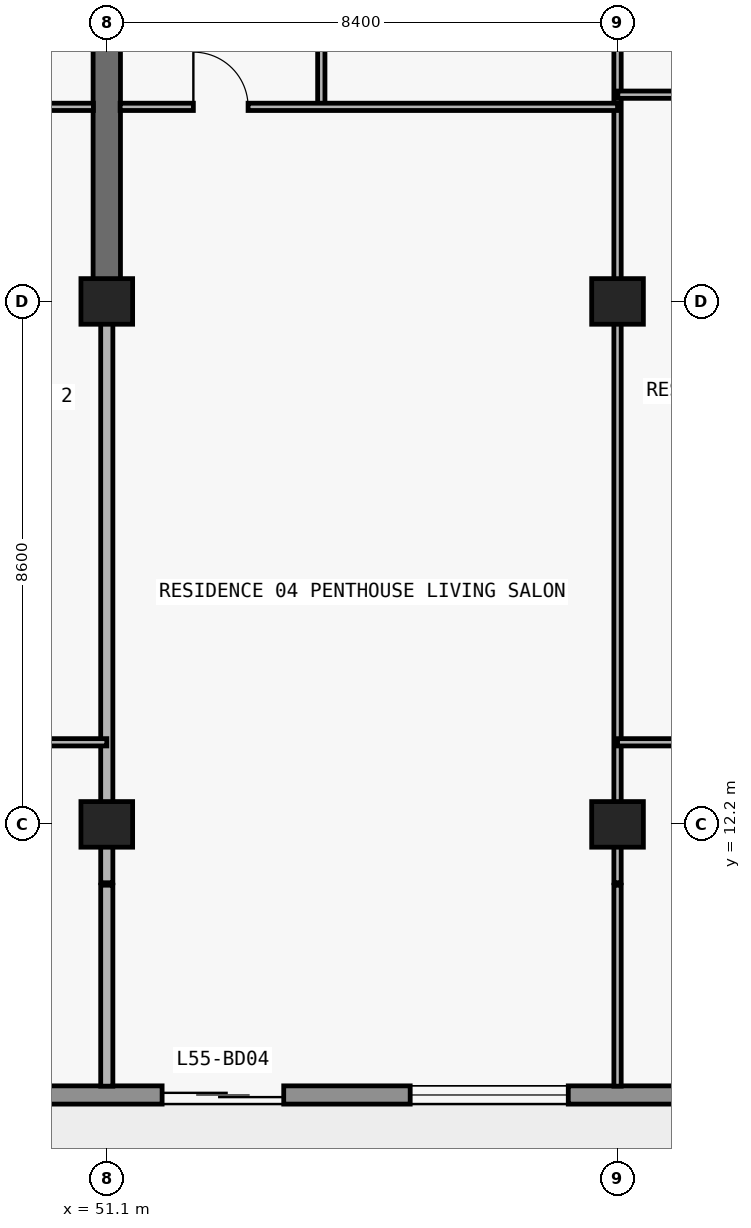
"""IFC4 building model, lengths in metres.
Left out: names, types, materials, properties, quantities, classifications, styles, units other than length and angle.
Written with IfcOpenShell. Run it as: python <this file> out.ifc"""

import sys

from ifc_helpers import new_model, si_unit, direction, frame, frame_2d, origin, origin_2d, place, context, subcontext, project, spatial, rectangle, extrude, element, fill, save


model = new_model("IFC4")
c1 = context("Model", 3, precision=1e-05, world=origin(), true_north=direction((0.0, 1.0)))
c2 = subcontext(c1, "Body", "Model", "MODEL_VIEW")
j1 = project(units=[si_unit("LENGTHUNIT", "METRE"), si_unit("PLANEANGLEUNIT", "RADIAN")], contexts=[c1])
p1 = place(None, origin())
s1 = spatial("IfcSite", under=j1, at=p1, CompositionType="ELEMENT")
p2 = place(p1, origin())
s2 = spatial("IfcBuilding", under=s1, at=p2, CompositionType="ELEMENT")
p3 = place(p2, frame((0.0, 0.0, 198.3)))
s3 = spatial("IfcBuildingStorey", under=s2, at=p3, CompositionType="ELEMENT", Elevation=198.3)
for number, where, z_axis, x_axis in (
    (1, (51.1, 12.2, 0.0), (0.0, 0.0, 1.0), (1.0, 0.0, 0.0)),
    (2, (59.5, 12.2, 0.0), (0.0, 0.0, 1.0), (1.0, 0.0, 0.0)),
    (3, (51.1, 20.8, 0.0), (0.0, 0.0, 1.0), (1.0, 0.0, 0.0)),
    (4, (59.5, 20.8, 0.0), (0.0, 0.0, 1.0), (1.0, 0.0, 0.0)),
):
    element("IfcColumn", number, at=place(p3, frame(where, z_axis=z_axis, x_axis=x_axis)), inside=s3, PredefinedType="COLUMN", context=c2, shape_type="SweptSolid", body=[
        extrude(rectangle(XDim=0.85, YDim=0.75, at=origin_2d()), origin(), (0.0, 0.0, 1.0), 3.05),
    ])
p4 = place(p3, frame((51.1, 20.8, 0.0), z_axis=(0.0, 0.0, 1.0), x_axis=(0.0, 1.0, 0.0)))
e5 = element("IfcWall", 5, at=p4, inside=s3, PredefinedType="SHEAR", context=c2, shape_type="SweptSolid", body=[
    extrude(rectangle(XDim=8.6, YDim=0.45, at=frame_2d((4.3, 0.0))), origin(), (0.0, 0.0, 1.0), 3.05),
])
p5 = place(p3, frame((67.7, 7.75, 0.0), z_axis=(0.0, 0.0, 1.0), x_axis=(-1.0, 0.0, 0.0)))
e6 = element("IfcWall", 6, at=p5, inside=s3, PredefinedType="STANDARD", context=c2, shape_type="SweptSolid", body=[
    extrude(rectangle(XDim=57.6, YDim=0.3, at=frame_2d((28.8, 0.0))), origin(), (0.0, 0.0, 1.0), 3.05),
])
p6 = place(p5, frame((54.673, 0.0, 0.0)))
e7 = element("IfcOpeningElement", 7, at=p6, cuts=e6, PredefinedType="OPENING", context=c2, shape_type="SweptSolid", body=[
    extrude(rectangle(XDim=2.0, YDim=2.3, at=frame_2d((1.0, 1.15))), frame((0.0, 0.16, 0.0), z_axis=(0.0, -1.0, 0.0), x_axis=(1.0, 0.0, 0.0)), (0.0, 0.0, 1.0), 0.32),
])
p7 = place(p5, frame((50.473, 0.0, 0.85)))
e8 = element("IfcOpeningElement", 8, at=p7, cuts=e6, PredefinedType="OPENING", context=c2, shape_type="SweptSolid", body=[
    extrude(rectangle(XDim=2.2, YDim=1.55, at=frame_2d((1.1, 0.775))), frame((0.0, 0.16, 0.0), z_axis=(0.0, -1.0, 0.0), x_axis=(1.0, 0.0, 0.0)), (0.0, 0.0, 1.0), 0.32),
])
p8 = place(p5, frame((46.09, 0.0, 0.0)))
e9 = element("IfcOpeningElement", 9, at=p8, cuts=e6, PredefinedType="OPENING", context=c2, shape_type="SweptSolid", body=[
    extrude(rectangle(XDim=2.0, YDim=2.3, at=frame_2d((1.0, 1.15))), frame((0.0, 0.16, 0.0), z_axis=(0.0, -1.0, 0.0), x_axis=(1.0, 0.0, 0.0)), (0.0, 0.0, 1.0), 0.32),
])
p9 = place(p5, frame((41.99, 0.0, 0.85)))
e10 = element("IfcOpeningElement", 10, at=p9, cuts=e6, PredefinedType="OPENING", context=c2, shape_type="SweptSolid", body=[
    extrude(rectangle(XDim=1.8, YDim=1.55, at=frame_2d((0.9, 0.775))), frame((0.0, 0.16, 0.0), z_axis=(0.0, -1.0, 0.0), x_axis=(1.0, 0.0, 0.0)), (0.0, 0.0, 1.0), 0.32),
])
p10 = place(p5, frame((38.09, 0.0, 0.0)))
e11 = element("IfcOpeningElement", 11, at=p10, cuts=e6, PredefinedType="OPENING", context=c2, shape_type="SweptSolid", body=[
    extrude(rectangle(XDim=2.0, YDim=2.3, at=frame_2d((1.0, 1.15))), frame((0.0, 0.16, 0.0), z_axis=(0.0, -1.0, 0.0), x_axis=(1.0, 0.0, 0.0)), (0.0, 0.0, 1.0), 0.32),
])
p11 = place(p5, frame((33.41, 0.0, 0.65)))
e12 = element("IfcOpeningElement", 12, at=p11, cuts=e6, PredefinedType="OPENING", context=c2, shape_type="SweptSolid", body=[
    extrude(rectangle(XDim=2.6, YDim=1.85, at=frame_2d((1.3, 0.925))), frame((0.0, 0.16, 0.0), z_axis=(0.0, -1.0, 0.0), x_axis=(1.0, 0.0, 0.0)), (0.0, 0.0, 1.0), 0.32),
])
p12 = place(p5, frame((27.7, 0.0, 0.85)))
e13 = element("IfcOpeningElement", 13, at=p12, cuts=e6, PredefinedType="OPENING", context=c2, shape_type="SweptSolid", body=[
    extrude(rectangle(XDim=2.2, YDim=1.55, at=frame_2d((1.1, 0.775))), frame((0.0, 0.16, 0.0), z_axis=(0.0, -1.0, 0.0), x_axis=(1.0, 0.0, 0.0)), (0.0, 0.0, 1.0), 0.32),
])
p13 = place(p5, frame((19.7, 0.0, 0.85)))
e14 = element("IfcOpeningElement", 14, at=p13, cuts=e6, PredefinedType="OPENING", context=c2, shape_type="SweptSolid", body=[
    extrude(rectangle(XDim=2.2, YDim=1.55, at=frame_2d((1.1, 0.775))), frame((0.0, 0.16, 0.0), z_axis=(0.0, -1.0, 0.0), x_axis=(1.0, 0.0, 0.0)), (0.0, 0.0, 1.0), 0.32),
])
p14 = place(p5, frame((13.69, 0.0, 0.0)))
e15 = element("IfcOpeningElement", 15, at=p14, cuts=e6, PredefinedType="OPENING", context=c2, shape_type="SweptSolid", body=[
    extrude(rectangle(XDim=2.0, YDim=2.3, at=frame_2d((1.0, 1.15))), frame((0.0, 0.16, 0.0), z_axis=(0.0, -1.0, 0.0), x_axis=(1.0, 0.0, 0.0)), (0.0, 0.0, 1.0), 0.32),
])
p15 = place(p5, frame((9.01, 0.0, 0.65)))
e16 = element("IfcOpeningElement", 16, at=p15, cuts=e6, PredefinedType="OPENING", context=c2, shape_type="SweptSolid", body=[
    extrude(rectangle(XDim=2.6, YDim=1.85, at=frame_2d((1.3, 0.925))), frame((0.0, 0.16, 0.0), z_axis=(0.0, -1.0, 0.0), x_axis=(1.0, 0.0, 0.0)), (0.0, 0.0, 1.0), 0.32),
])
p16 = place(p5, frame((3.0, 0.0, 0.85)))
e17 = element("IfcOpeningElement", 17, at=p16, cuts=e6, PredefinedType="OPENING", context=c2, shape_type="SweptSolid", body=[
    extrude(rectangle(XDim=2.2, YDim=1.55, at=frame_2d((1.1, 0.775))), frame((0.0, 0.16, 0.0), z_axis=(0.0, -1.0, 0.0), x_axis=(1.0, 0.0, 0.0)), (0.0, 0.0, 1.0), 0.32),
])
p17 = place(p3, frame((51.1, 7.895, 0.0), z_axis=(0.0, 0.0, 1.0), x_axis=(0.0, 1.0, 0.0)))
e18 = element("IfcWall", 18, at=p17, inside=s3, PredefinedType="PARTITIONING", context=c2, shape_type="SweptSolid", body=[
    extrude(rectangle(XDim=3.305, YDim=0.2, at=frame_2d((1.652, 0.0))), origin(), (0.0, 0.0, 1.0), 3.05),
])
p18 = place(p3, frame((51.1, 11.24, 0.0), z_axis=(0.0, 0.0, 1.0), x_axis=(0.0, 1.0, 0.0)))
e19 = element("IfcWall", 19, at=p18, inside=s3, PredefinedType="PARTITIONING", context=c2, shape_type="SweptSolid", body=[
    extrude(rectangle(XDim=9.555, YDim=0.2, at=frame_2d((4.777, 0.0))), origin(), (0.0, 0.0, 1.0), 2.263),
])
p19 = place(p3, frame((54.628, 24.0, 0.0), z_axis=(0.0, 0.0, 1.0), x_axis=(0.0, 1.0, 0.0)))
e20 = element("IfcWall", 20, at=p19, inside=s3, PredefinedType="PARTITIONING", context=c2, shape_type="SweptSolid", body=[
    extrude(rectangle(XDim=4.8, YDim=0.12, at=frame_2d((2.4, 0.0))), origin(), (0.0, 0.0, 1.0), 3.05),
])
p20 = place(p19, frame((1.95, 0.0, 0.0)))
e21 = element("IfcOpeningElement", 21, at=p20, cuts=e20, PredefinedType="OPENING", context=c2, shape_type="SweptSolid", body=[
    extrude(rectangle(XDim=0.9, YDim=2.15, at=frame_2d((0.45, 1.075))), frame((0.0, 0.07, 0.0), z_axis=(0.0, -1.0, 0.0), x_axis=(1.0, 0.0, 0.0)), (0.0, 0.0, 1.0), 0.14),
])
p21 = place(p3, frame((59.5, 7.895, 0.0), z_axis=(0.0, 0.0, 1.0), x_axis=(0.0, 1.0, 0.0)))
e22 = element("IfcWall", 22, at=p21, inside=s3, PredefinedType="PARTITIONING", context=c2, shape_type="SweptSolid", body=[
    extrude(rectangle(XDim=3.305, YDim=0.12, at=frame_2d((1.652, 0.0))), origin(), (0.0, 0.0, 1.0), 3.05),
])
p22 = place(p3, frame((59.5, 11.24, 0.0), z_axis=(0.0, 0.0, 1.0), x_axis=(0.0, 1.0, 0.0)))
e23 = element("IfcWall", 23, at=p22, inside=s3, PredefinedType="PARTITIONING", context=c2, shape_type="SweptSolid", body=[
    extrude(rectangle(XDim=23.46, YDim=0.12, at=frame_2d((11.73, 0.0))), origin(), (0.0, 0.0, 1.0), 2.263),
])
p23 = place(p22, frame((14.71, 0.0, 0.0)))
e24 = element("IfcOpeningElement", 24, at=p23, cuts=e23, PredefinedType="OPENING", context=c2, shape_type="SweptSolid", body=[
    extrude(rectangle(XDim=0.9, YDim=2.15, at=frame_2d((0.45, 1.075))), frame((0.0, 0.07, 0.0), z_axis=(0.0, -1.0, 0.0), x_axis=(1.0, 0.0, 0.0)), (0.0, 0.0, 1.0), 0.14),
])
p24 = place(p3, frame((35.1, 13.55, 0.0), z_axis=(0.0, 0.0, 1.0), x_axis=(1.0, 0.0, 0.0)))
e25 = element("IfcWall", 25, at=p24, inside=s3, PredefinedType="PARTITIONING", context=c2, shape_type="SweptSolid", body=[
    extrude(rectangle(XDim=16.0, YDim=0.12, at=frame_2d((8.0, 0.0))), origin(), (0.0, 0.0, 1.0), 3.05),
])
p25 = place(p24, frame((3.35, 0.0, 0.0)))
e26 = element("IfcOpeningElement", 26, at=p25, cuts=e25, PredefinedType="OPENING", context=c2, shape_type="SweptSolid", body=[
    extrude(rectangle(XDim=0.9, YDim=2.15, at=frame_2d((0.45, 1.075))), frame((0.0, 0.07, 0.0), z_axis=(0.0, -1.0, 0.0), x_axis=(1.0, 0.0, 0.0)), (0.0, 0.0, 1.0), 0.14),
])
p26 = place(p24, frame((11.35, 0.0, 0.0)))
e27 = element("IfcOpeningElement", 27, at=p26, cuts=e25, PredefinedType="OPENING", context=c2, shape_type="SweptSolid", body=[
    extrude(rectangle(XDim=0.9, YDim=2.15, at=frame_2d((0.45, 1.075))), frame((0.0, 0.07, 0.0), z_axis=(0.0, -1.0, 0.0), x_axis=(1.0, 0.0, 0.0)), (0.0, 0.0, 1.0), 0.14),
])
p27 = place(p3, frame((59.5, 13.55, 0.0), z_axis=(0.0, 0.0, 1.0), x_axis=(1.0, 0.0, 0.0)))
e28 = element("IfcWall", 28, at=p27, inside=s3, PredefinedType="PARTITIONING", context=c2, shape_type="SweptSolid", body=[
    extrude(rectangle(XDim=8.2, YDim=0.12, at=frame_2d((4.1, 0.0))), origin(), (0.0, 0.0, 1.0), 3.05),
])
p28 = place(p27, frame((3.65, 0.0, 0.0)))
e29 = element("IfcOpeningElement", 29, at=p28, cuts=e28, PredefinedType="OPENING", context=c2, shape_type="SweptSolid", body=[
    extrude(rectangle(XDim=0.9, YDim=2.15, at=frame_2d((0.45, 1.075))), frame((0.0, 0.07, 0.0), z_axis=(0.0, -1.0, 0.0), x_axis=(1.0, 0.0, 0.0)), (0.0, 0.0, 1.0), 0.14),
])
p29 = place(p3, frame((42.7, 24.0, 0.0), z_axis=(0.0, 0.0, 1.0), x_axis=(1.0, 0.0, 0.0)))
e30 = element("IfcWall", 30, at=p29, inside=s3, PredefinedType="PARTITIONING", context=c2, shape_type="SweptSolid", body=[
    extrude(rectangle(XDim=8.18, YDim=0.12, at=frame_2d((4.09, 0.0))), origin(), (0.0, 0.0, 1.0), 3.05),
])
p30 = place(p29, frame((3.64, 0.0, 0.0)))
e31 = element("IfcOpeningElement", 31, at=p30, cuts=e30, PredefinedType="OPENING", context=c2, shape_type="SweptSolid", body=[
    extrude(rectangle(XDim=0.9, YDim=2.15, at=frame_2d((0.45, 1.075))), frame((0.0, 0.07, 0.0), z_axis=(0.0, -1.0, 0.0), x_axis=(1.0, 0.0, 0.0)), (0.0, 0.0, 1.0), 0.14),
])
p31 = place(p3, frame((51.32, 24.0, 0.0), z_axis=(0.0, 0.0, 1.0), x_axis=(1.0, 0.0, 0.0)))
e32 = element("IfcWall", 32, at=p31, inside=s3, PredefinedType="PARTITIONING", context=c2, shape_type="SweptSolid", body=[
    extrude(rectangle(XDim=8.18, YDim=0.12, at=frame_2d((4.09, 0.0))), origin(), (0.0, 0.0, 1.0), 3.05),
])
p32 = place(p31, frame((1.204, 0.0, 0.0)))
e33 = element("IfcOpeningElement", 33, at=p32, cuts=e32, PredefinedType="OPENING", context=c2, shape_type="SweptSolid", body=[
    extrude(rectangle(XDim=0.9, YDim=2.15, at=frame_2d((0.45, 1.075))), frame((0.0, 0.07, 0.0), z_axis=(0.0, -1.0, 0.0), x_axis=(1.0, 0.0, 0.0)), (0.0, 0.0, 1.0), 0.14),
])
p33 = place(p3, frame((59.505, 24.2, 0.0), z_axis=(0.0, 0.0, 1.0), x_axis=(1.0, 0.0, 0.0)))
e34 = element("IfcWall", 34, at=p33, inside=s3, PredefinedType="PARTITIONING", context=c2, shape_type="SweptSolid", body=[
    extrude(rectangle(XDim=8.195, YDim=0.12, at=frame_2d((4.098, 0.0))), origin(), (0.0, 0.0, 1.0), 3.05),
])
p34 = place(p33, frame((3.647, 0.0, 0.0)))
e35 = element("IfcOpeningElement", 35, at=p34, cuts=e34, PredefinedType="OPENING", context=c2, shape_type="SweptSolid", body=[
    extrude(rectangle(XDim=0.9, YDim=2.15, at=frame_2d((0.45, 1.075))), frame((0.0, 0.07, 0.0), z_axis=(0.0, -1.0, 0.0), x_axis=(1.0, 0.0, 0.0)), (0.0, 0.0, 1.0), 0.14),
])
p35 = place(p14, origin())
e36 = element("IfcDoor", 36, at=p35, inside=s3, OperationType="DOUBLE_DOOR_SLIDING", PredefinedType="DOOR", context=c2, shape_type="SweptSolid", body=[
    extrude(rectangle(XDim=2.0, YDim=2.3, at=frame_2d((1.0, 1.15))), frame((0.0, 0.025, 0.0), z_axis=(0.0, -1.0, 0.0), x_axis=(1.0, 0.0, 0.0)), (0.0, 0.0, 1.0), 0.05),
])
fill(e15, e36)
p36 = place(p15, origin())
e37 = element("IfcWindow", 37, at=p36, inside=s3, PartitioningType="SINGLE_PANEL", PredefinedType="WINDOW", context=c2, shape_type="SweptSolid", body=[
    extrude(rectangle(XDim=2.6, YDim=1.85, at=frame_2d((1.3, 0.925))), frame((0.0, 0.03, 0.0), z_axis=(0.0, -1.0, 0.0), x_axis=(1.0, 0.0, 0.0)), (0.0, 0.0, 1.0), 0.06),
])
fill(e16, e37)
p37 = place(p32, origin())
e38 = element("IfcDoor", 38, at=p37, inside=s3, OperationType="SINGLE_SWING_LEFT", PredefinedType="DOOR", context=c2, shape_type="SweptSolid", body=[
    extrude(rectangle(XDim=0.9, YDim=2.15, at=frame_2d((0.45, 1.075))), frame((0.0, 0.025, 0.0), z_axis=(0.0, -1.0, 0.0), x_axis=(1.0, 0.0, 0.0)), (0.0, 0.0, 1.0), 0.05),
])
fill(e33, e38)
save(model, sys.argv[1])
